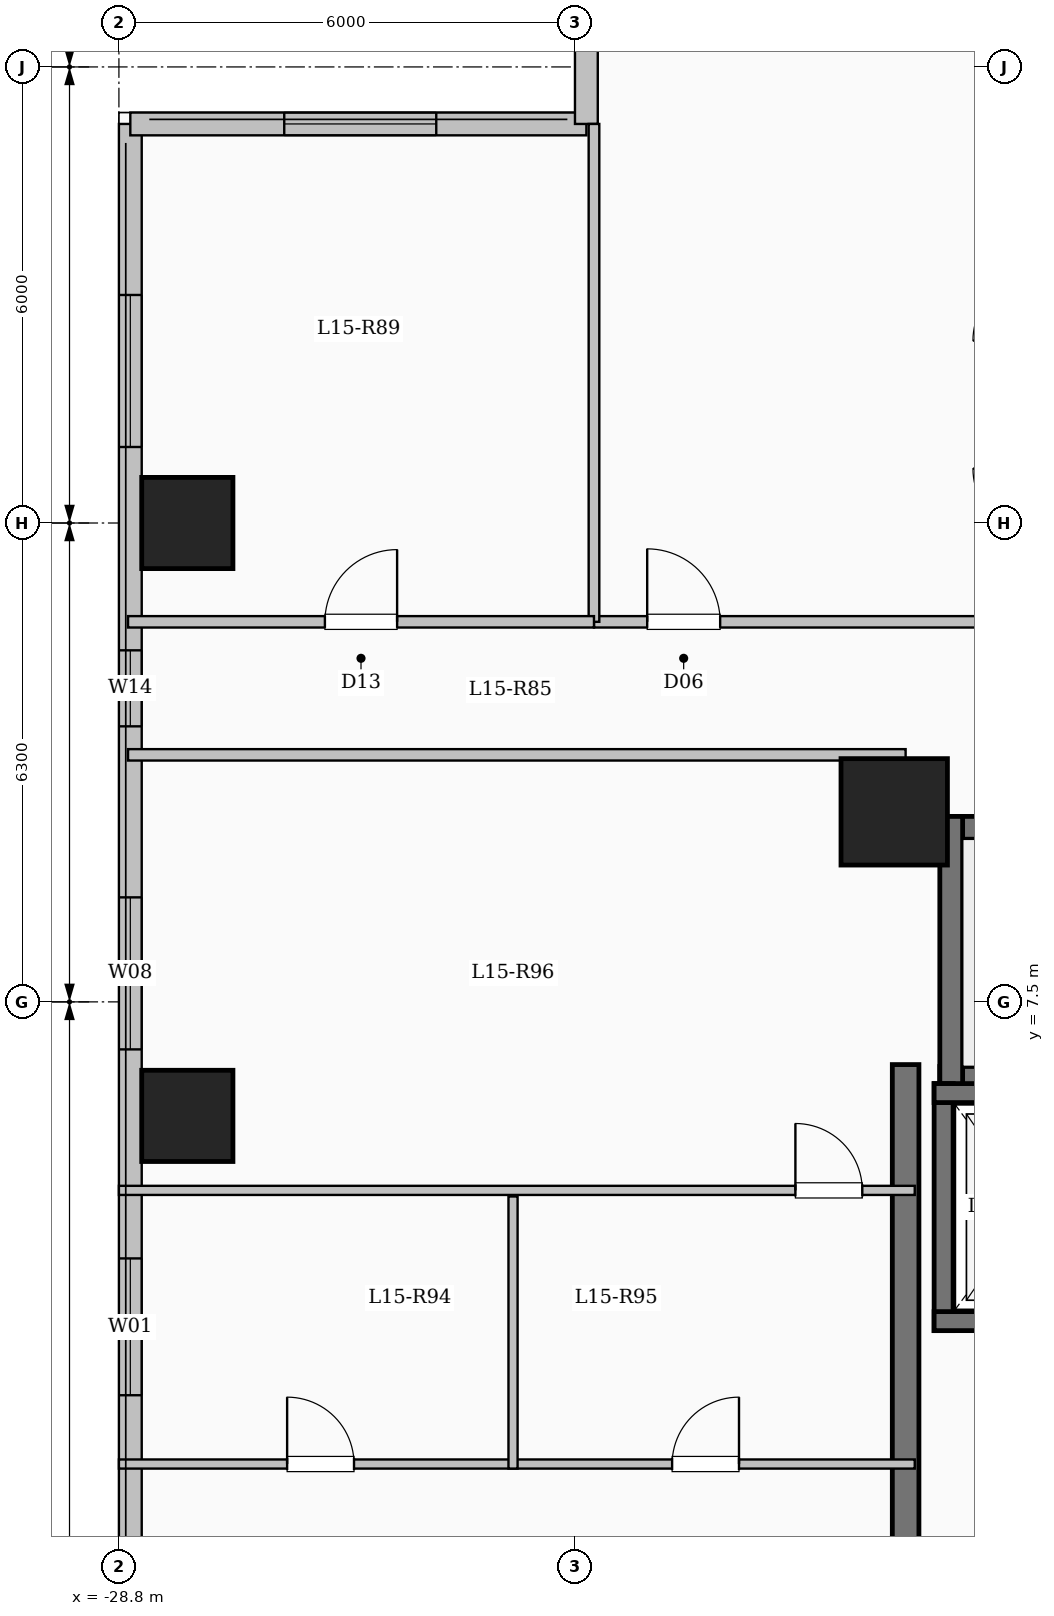
"""IFC4 building model, lengths in metres.
Left out: names, types, materials, properties, quantities, classifications, styles, units other than length and angle.
Written with IfcOpenShell. Run it as: python <this file> out.ifc"""

import sys

from ifc_helpers import new_model, si_unit, direction, frame, frame_2d, origin, origin_2d, place, context, subcontext, project, spatial, rectangle, extrude, element, fill, save


model = new_model("IFC4")
c1 = context("Model", 3, precision=1e-05, world=origin(), true_north=direction((0.0, 1.0)))
c2 = subcontext(c1, "Body", "Model", "MODEL_VIEW")
j1 = project(units=[si_unit("LENGTHUNIT", "METRE"), si_unit("PLANEANGLEUNIT", "RADIAN")], contexts=[c1])
p1 = place(None, origin())
s1 = spatial("IfcSite", under=j1, at=p1, CompositionType="ELEMENT")
p2 = place(p1, origin())
s2 = spatial("IfcBuilding", under=s1, at=p2, CompositionType="ELEMENT")
p3 = place(p2, frame((0.0, 0.0, 57.5)))
s3 = spatial("IfcBuildingStorey", under=s2, at=p3, CompositionType="ELEMENT", Elevation=57.5)
p4 = place(p3, frame((-18.6, 10.0, 0.0), z_axis=(0.0, 0.0, 1.0), x_axis=(1.0, 0.0, 0.0)))
e1 = element("IfcColumn", 1, at=p4, inside=s3, PredefinedType="COLUMN", context=c2, shape_type="SweptSolid", body=[
    extrude(rectangle(XDim=1.4, YDim=1.4, at=origin_2d()), origin(), (0.0, 0.0, 1.0), 3.35),
])
for number, where, z_axis, x_axis in (
    (2, (-27.9, 6.0, 0.0), (0.0, 0.0, 1.0), (1.0, 0.0, 0.0)),
    (3, (-27.9, 13.8, 0.0), (0.0, 0.0, 1.0), (1.0, 0.0, 0.0)),
):
    element("IfcColumn", number, at=place(p3, frame(where, z_axis=z_axis, x_axis=x_axis)), inside=s3, PredefinedType="COLUMN", context=c2, shape_type="SweptSolid", body=[
        extrude(rectangle(XDim=1.2, YDim=1.2, at=origin_2d()), origin(), (0.0, 0.0, 1.0), 3.35),
    ])
p5 = place(p3, frame((-28.65, -19.05, 0.0), z_axis=(0.0, 0.0, 1.0), x_axis=(0.0, 1.0, 0.0)))
e4 = element("IfcWall", 4, at=p5, inside=s3, PredefinedType="SOLIDWALL", context=c2, shape_type="SweptSolid", body=[
    extrude(rectangle(XDim=38.1, YDim=0.3, at=frame_2d((19.05, 0.0))), origin(), (0.0, 0.0, 1.0), 3.1),
])
p6 = place(p5, frame((3.15, 0.0, 0.9)))
e5 = element("IfcOpeningElement", 5, at=p6, cuts=e4, PredefinedType="OPENING", context=c2, shape_type="SweptSolid", body=[
    extrude(rectangle(XDim=2.4, YDim=1.8, at=frame_2d((1.2, 0.9))), frame((0.0, 0.16, 0.0), z_axis=(0.0, -1.0, 0.0), x_axis=(1.0, 0.0, 0.0)), (0.0, 0.0, 1.0), 0.32),
])
p7 = place(p5, frame((9.542, 0.0, 0.9)))
e6 = element("IfcOpeningElement", 6, at=p7, cuts=e4, PredefinedType="OPENING", context=c2, shape_type="SweptSolid", body=[
    extrude(rectangle(XDim=1.5, YDim=1.65, at=frame_2d((0.75, 0.825))), frame((0.0, 0.16, 0.0), z_axis=(0.0, -1.0, 0.0), x_axis=(1.0, 0.0, 0.0)), (0.0, 0.0, 1.0), 0.32),
])
p8 = place(p5, frame((14.95, 0.0, 0.9)))
e7 = element("IfcOpeningElement", 7, at=p8, cuts=e4, PredefinedType="OPENING", context=c2, shape_type="SweptSolid", body=[
    extrude(rectangle(XDim=2.4, YDim=1.8, at=frame_2d((1.2, 0.9))), frame((0.0, 0.16, 0.0), z_axis=(0.0, -1.0, 0.0), x_axis=(1.0, 0.0, 0.0)), (0.0, 0.0, 1.0), 0.32),
])
p9 = place(p5, frame((21.375, 0.0, 0.9)))
e8 = element("IfcOpeningElement", 8, at=p9, cuts=e4, PredefinedType="OPENING", context=c2, shape_type="SweptSolid", body=[
    extrude(rectangle(XDim=1.8, YDim=1.65, at=frame_2d((0.9, 0.825))), frame((0.0, 0.16, 0.0), z_axis=(0.0, -1.0, 0.0), x_axis=(1.0, 0.0, 0.0)), (0.0, 0.0, 1.0), 0.32),
])
p10 = place(p5, frame((25.925, 0.0, 0.9)))
e9 = element("IfcOpeningElement", 9, at=p10, cuts=e4, PredefinedType="OPENING", context=c2, shape_type="SweptSolid", body=[
    extrude(rectangle(XDim=2.0, YDim=1.7, at=frame_2d((1.0, 0.85))), frame((0.0, 0.16, 0.0), z_axis=(0.0, -1.0, 0.0), x_axis=(1.0, 0.0, 0.0)), (0.0, 0.0, 1.0), 0.32),
])
p11 = place(p5, frame((30.175, 0.0, 0.95)))
e10 = element("IfcOpeningElement", 10, at=p11, cuts=e4, PredefinedType="OPENING", context=c2, shape_type="SweptSolid", body=[
    extrude(rectangle(XDim=1.0, YDim=1.5, at=frame_2d((0.5, 0.75))), frame((0.0, 0.16, 0.0), z_axis=(0.0, -1.0, 0.0), x_axis=(1.0, 0.0, 0.0)), (0.0, 0.0, 1.0), 0.32),
])
p12 = place(p5, frame((33.85, 0.0, 0.9)))
e11 = element("IfcOpeningElement", 11, at=p12, cuts=e4, PredefinedType="OPENING", context=c2, shape_type="SweptSolid", body=[
    extrude(rectangle(XDim=2.0, YDim=1.7, at=frame_2d((1.0, 0.85))), frame((0.0, 0.16, 0.0), z_axis=(0.0, -1.0, 0.0), x_axis=(1.0, 0.0, 0.0)), (0.0, 0.0, 1.0), 0.32),
])
p13 = place(p3, frame((-28.65, 19.05, 0.0), z_axis=(0.0, 0.0, 1.0), x_axis=(1.0, 0.0, 0.0)))
e12 = element("IfcWall", 12, at=p13, inside=s3, PredefinedType="SOLIDWALL", context=c2, shape_type="SweptSolid", body=[
    extrude(rectangle(XDim=6.0, YDim=0.3, at=frame_2d((3.0, 0.0))), origin(), (0.0, 0.0, 1.0), 3.1),
])
p14 = place(p13, frame((2.025, 0.0, 0.9)))
e13 = element("IfcOpeningElement", 13, at=p14, cuts=e12, PredefinedType="OPENING", context=c2, shape_type="SweptSolid", body=[
    extrude(rectangle(XDim=2.0, YDim=1.7, at=frame_2d((1.0, 0.85))), frame((0.0, 0.16, 0.0), z_axis=(0.0, -1.0, 0.0), x_axis=(1.0, 0.0, 0.0)), (0.0, 0.0, 1.0), 0.32),
])
p15 = place(p3, frame((-22.65, 19.05, 0.0), z_axis=(0.0, 0.0, 1.0), x_axis=(0.0, 1.0, 0.0)))
e14 = element("IfcWall", 14, at=p15, inside=s3, PredefinedType="SOLIDWALL", context=c2, shape_type="SweptSolid", body=[
    extrude(rectangle(XDim=4.5, YDim=0.3, at=frame_2d((2.25, 0.0))), origin(), (0.0, 0.0, 1.0), 3.1),
])
p16 = place(p15, frame((1.032, 0.0, 0.9)))
e15 = element("IfcOpeningElement", 15, at=p16, cuts=e14, PredefinedType="OPENING", context=c2, shape_type="SweptSolid", body=[
    extrude(rectangle(XDim=2.4, YDim=1.8, at=frame_2d((1.2, 0.9))), frame((0.0, 0.16, 0.0), z_axis=(0.0, -1.0, 0.0), x_axis=(1.0, 0.0, 0.0)), (0.0, 0.0, 1.0), 0.32),
])
p17 = place(p3, frame((-18.0, 9.79, 0.0), z_axis=(0.0, 0.0, 1.0), x_axis=(1.0, 0.0, 0.0)))
e16 = element("IfcWall", 16, at=p17, inside=s3, PredefinedType="SHEAR", context=c2, shape_type="SweptSolid", body=[
    extrude(rectangle(XDim=8.0, YDim=0.3, at=frame_2d((4.0, 0.0))), origin(), (0.0, 0.0, 1.0), 3.35),
])
p18 = place(p3, frame((-18.0, 6.5, 0.0), z_axis=(0.0, 0.0, 1.0), x_axis=(1.0, 0.0, 0.0)))
e17 = element("IfcWall", 17, at=p18, inside=s3, PredefinedType="SHEAR", context=c2, shape_type="SweptSolid", body=[
    extrude(rectangle(XDim=8.0, YDim=0.3, at=frame_2d((4.0, 0.0))), origin(), (0.0, 0.0, 1.0), 3.35),
])
p19 = place(p18, frame((6.45, 0.0, 0.0)))
e18 = element("IfcOpeningElement", 18, at=p19, cuts=e17, PredefinedType="OPENING", context=c2, shape_type="SweptSolid", body=[
    extrude(rectangle(XDim=1.0, YDim=2.15, at=frame_2d((0.5, 1.075))), frame((0.0, 0.16, 0.0), z_axis=(0.0, -1.0, 0.0), x_axis=(1.0, 0.0, 0.0)), (0.0, 0.0, 1.0), 0.32),
])
p20 = place(p3, frame((-17.85, 6.35, 0.0), z_axis=(0.0, 0.0, 1.0), x_axis=(0.0, 1.0, 0.0)))
e19 = element("IfcWall", 19, at=p20, inside=s3, PredefinedType="SHEAR", context=c2, shape_type="SweptSolid", body=[
    extrude(rectangle(XDim=3.59, YDim=0.3, at=frame_2d((1.795, 0.0))), origin(), (0.0, 0.0, 1.0), 3.35),
])
p21 = place(p3, frame((-17.95, 3.175, 0.0), z_axis=(0.0, 0.0, 1.0), x_axis=(0.0, 1.0, 0.0)))
e20 = element("IfcWall", 20, at=p21, inside=s3, PredefinedType="SHEAR", context=c2, shape_type="SweptSolid", body=[
    extrude(rectangle(XDim=3.25, YDim=0.25, at=frame_2d((1.625, 0.0))), origin(), (0.0, 0.0, 1.0), 3.35),
])
for number, where, z_axis, x_axis in (
    (21, (-18.075, 3.3, 0.0), (0.0, 0.0, 1.0), (1.0, 0.0, 0.0)),
    (22, (-18.075, 6.3, 0.0), (0.0, 0.0, 1.0), (1.0, 0.0, 0.0)),
):
    element("IfcWall", number, at=place(p3, frame(where, z_axis=z_axis, x_axis=x_axis)), inside=s3, PredefinedType="SHEAR", context=c2, shape_type="SweptSolid", body=[
        extrude(rectangle(XDim=2.55, YDim=0.25, at=frame_2d((1.275, 0.0))), origin(), (0.0, 0.0, 1.0), 3.35),
    ])
p22 = place(p3, frame((-18.45, -7.375, 0.0), z_axis=(0.0, 0.0, 1.0), x_axis=(0.0, 1.0, 0.0)))
e23 = element("IfcWall", 23, at=p22, inside=s3, PredefinedType="SHEAR", context=c2, shape_type="SweptSolid", body=[
    extrude(rectangle(XDim=14.05, YDim=0.35, at=frame_2d((7.025, 0.0))), origin(), (0.0, 0.0, 1.0), 3.35),
])
p23 = place(p3, frame((-22.55, 12.5, 0.0), z_axis=(0.0, 0.0, 1.0), x_axis=(1.0, 0.0, 0.0)))
e24 = element("IfcWall", 24, at=p23, inside=s3, PredefinedType="PARTITIONING", context=c2, shape_type="SweptSolid", body=[
    extrude(rectangle(XDim=18.7, YDim=0.15, at=frame_2d((9.35, 0.0))), origin(), (0.0, 0.0, 1.0), 3.1),
])
p24 = place(p23, frame((0.7, 0.0, 0.0)))
e25 = element("IfcOpeningElement", 25, at=p24, cuts=e24, PredefinedType="OPENING", context=c2, shape_type="SweptSolid", body=[
    extrude(rectangle(XDim=0.96, YDim=2.15, at=frame_2d((0.48, 1.075))), frame((0.0, 0.085, 0.0), z_axis=(0.0, -1.0, 0.0), x_axis=(1.0, 0.0, 0.0)), (0.0, 0.0, 1.0), 0.17),
])
p25 = place(p23, frame((11.326, 0.0, 0.0)))
e26 = element("IfcOpeningElement", 26, at=p25, cuts=e24, PredefinedType="OPENING", context=c2, shape_type="SweptSolid", body=[
    extrude(rectangle(XDim=0.96, YDim=2.15, at=frame_2d((0.48, 1.075))), frame((0.0, 0.085, 0.0), z_axis=(0.0, -1.0, 0.0), x_axis=(1.0, 0.0, 0.0)), (0.0, 0.0, 1.0), 0.17),
])
p26 = place(p3, frame((-28.68, 10.75, 0.0), z_axis=(0.0, 0.0, 1.0), x_axis=(1.0, 0.0, 0.0)))
e27 = element("IfcWall", 27, at=p26, inside=s3, PredefinedType="PARTITIONING", context=c2, shape_type="SweptSolid", body=[
    extrude(rectangle(XDim=10.23, YDim=0.15, at=frame_2d((5.115, 0.0))), origin(), (0.0, 0.0, 1.0), 3.1),
])
p27 = place(p3, frame((-22.55, 12.5, 0.0), z_axis=(0.0, 0.0, 1.0), x_axis=(0.0, 1.0, 0.0)))
e28 = element("IfcWall", 28, at=p27, inside=s3, PredefinedType="PARTITIONING", context=c2, shape_type="SweptSolid", body=[
    extrude(rectangle(XDim=6.55, YDim=0.14, at=frame_2d((3.275, 0.0))), origin(), (0.0, 0.0, 1.0), 3.1),
])
p28 = place(p3, frame((-28.68, 12.5, 0.0), z_axis=(0.0, 0.0, 1.0), x_axis=(1.0, 0.0, 0.0)))
e29 = element("IfcWall", 29, at=p28, inside=s3, PredefinedType="PARTITIONING", context=c2, shape_type="SweptSolid", body=[
    extrude(rectangle(XDim=6.13, YDim=0.15, at=frame_2d((3.065, 0.0))), origin(), (0.0, 0.0, 1.0), 3.1),
])
p29 = place(p28, frame((2.59, 0.0, 0.0)))
e30 = element("IfcOpeningElement", 30, at=p29, cuts=e29, PredefinedType="OPENING", context=c2, shape_type="SweptSolid", body=[
    extrude(rectangle(XDim=0.95, YDim=2.15, at=frame_2d((0.475, 1.075))), frame((0.0, 0.085, 0.0), z_axis=(0.0, -1.0, 0.0), x_axis=(1.0, 0.0, 0.0)), (0.0, 0.0, 1.0), 0.17),
])
p30 = place(p3, frame((-28.8, 1.42, 0.0), z_axis=(0.0, 0.0, 1.0), x_axis=(1.0, 0.0, 0.0)))
e31 = element("IfcWall", 31, at=p30, inside=s3, PredefinedType="PARTITIONING", context=c2, shape_type="SweptSolid", body=[
    extrude(rectangle(XDim=10.47, YDim=0.12, at=frame_2d((5.235, 0.0))), origin(), (0.0, 0.0, 1.0), 3.1),
])
p31 = place(p30, frame((2.213, 0.0, 0.0)))
e32 = element("IfcOpeningElement", 32, at=p31, cuts=e31, PredefinedType="OPENING", context=c2, shape_type="SweptSolid", body=[
    extrude(rectangle(XDim=0.88, YDim=2.1, at=frame_2d((0.44, 1.05))), frame((0.0, 0.07, 0.0), z_axis=(0.0, -1.0, 0.0), x_axis=(1.0, 0.0, 0.0)), (0.0, 0.0, 1.0), 0.14),
])
p32 = place(p30, frame((7.278, 0.0, 0.0)))
e33 = element("IfcOpeningElement", 33, at=p32, cuts=e31, PredefinedType="OPENING", context=c2, shape_type="SweptSolid", body=[
    extrude(rectangle(XDim=0.88, YDim=2.1, at=frame_2d((0.44, 1.05))), frame((0.0, 0.07, 0.0), z_axis=(0.0, -1.0, 0.0), x_axis=(1.0, 0.0, 0.0)), (0.0, 0.0, 1.0), 0.14),
])
p33 = place(p3, frame((-28.8, 5.02, 0.0), z_axis=(0.0, 0.0, 1.0), x_axis=(1.0, 0.0, 0.0)))
e34 = element("IfcWall", 34, at=p33, inside=s3, PredefinedType="PARTITIONING", context=c2, shape_type="SweptSolid", body=[
    extrude(rectangle(XDim=10.47, YDim=0.12, at=frame_2d((5.235, 0.0))), origin(), (0.0, 0.0, 1.0), 3.1),
])
p34 = place(p33, frame((8.9, 0.0, 0.0)))
e35 = element("IfcOpeningElement", 35, at=p34, cuts=e34, PredefinedType="OPENING", context=c2, shape_type="SweptSolid", body=[
    extrude(rectangle(XDim=0.88, YDim=2.1, at=frame_2d((0.44, 1.05))), frame((0.0, 0.07, 0.0), z_axis=(0.0, -1.0, 0.0), x_axis=(1.0, 0.0, 0.0)), (0.0, 0.0, 1.0), 0.14),
])
p35 = place(p3, frame((-23.615, 1.36, 0.0), z_axis=(0.0, 0.0, 1.0), x_axis=(0.0, 1.0, 0.0)))
e36 = element("IfcWall", 36, at=p35, inside=s3, PredefinedType="PARTITIONING", context=c2, shape_type="SweptSolid", body=[
    extrude(rectangle(XDim=3.58, YDim=0.12, at=frame_2d((1.79, 0.0))), origin(), (0.0, 0.0, 1.0), 3.1),
])
p36 = place(p9, origin())
e37 = element("IfcWindow", 37, at=p36, inside=s3, PartitioningType="SINGLE_PANEL", PredefinedType="WINDOW", context=c2, shape_type="SweptSolid", body=[
    extrude(rectangle(XDim=1.8, YDim=1.65, at=frame_2d((0.9, 0.825))), frame((0.0, 0.03, 0.0), z_axis=(0.0, -1.0, 0.0), x_axis=(1.0, 0.0, 0.0)), (0.0, 0.0, 1.0), 0.06),
])
fill(e8, e37)
p37 = place(p10, origin())
e38 = element("IfcWindow", 38, at=p37, inside=s3, PartitioningType="SINGLE_PANEL", PredefinedType="WINDOW", context=c2, shape_type="SweptSolid", body=[
    extrude(rectangle(XDim=2.0, YDim=1.7, at=frame_2d((1.0, 0.85))), frame((0.0, 0.03, 0.0), z_axis=(0.0, -1.0, 0.0), x_axis=(1.0, 0.0, 0.0)), (0.0, 0.0, 1.0), 0.06),
])
fill(e9, e38)
p38 = place(p11, origin())
e39 = element("IfcWindow", 39, at=p38, inside=s3, PartitioningType="SINGLE_PANEL", PredefinedType="WINDOW", context=c2, shape_type="SweptSolid", body=[
    extrude(rectangle(XDim=1.0, YDim=1.5, at=frame_2d((0.5, 0.75))), frame((0.0, 0.03, 0.0), z_axis=(0.0, -1.0, 0.0), x_axis=(1.0, 0.0, 0.0)), (0.0, 0.0, 1.0), 0.06),
])
fill(e10, e39)
p39 = place(p12, origin())
e40 = element("IfcWindow", 40, at=p39, inside=s3, PartitioningType="SINGLE_PANEL", PredefinedType="WINDOW", context=c2, shape_type="SweptSolid", body=[
    extrude(rectangle(XDim=2.0, YDim=1.7, at=frame_2d((1.0, 0.85))), frame((0.0, 0.03, 0.0), z_axis=(0.0, -1.0, 0.0), x_axis=(1.0, 0.0, 0.0)), (0.0, 0.0, 1.0), 0.06),
])
fill(e11, e40)
p40 = place(p14, origin())
e41 = element("IfcWindow", 41, at=p40, inside=s3, PartitioningType="SINGLE_PANEL", PredefinedType="WINDOW", context=c2, shape_type="SweptSolid", body=[
    extrude(rectangle(XDim=2.0, YDim=1.7, at=frame_2d((1.0, 0.85))), frame((0.0, 0.03, 0.0), z_axis=(0.0, -1.0, 0.0), x_axis=(1.0, 0.0, 0.0)), (0.0, 0.0, 1.0), 0.06),
])
fill(e13, e41)
p41 = place(p24, origin())
e42 = element("IfcDoor", 42, at=p41, inside=s3, OperationType="SINGLE_SWING_LEFT", PredefinedType="DOOR", context=c2, shape_type="SweptSolid", body=[
    extrude(rectangle(XDim=0.96, YDim=2.15, at=frame_2d((0.48, 1.075))), frame((0.0, 0.025, 0.0), z_axis=(0.0, -1.0, 0.0), x_axis=(1.0, 0.0, 0.0)), (0.0, 0.0, 1.0), 0.05),
])
fill(e25, e42)
p42 = place(p29, origin())
e43 = element("IfcDoor", 43, at=p42, inside=s3, OperationType="SINGLE_SWING_RIGHT", PredefinedType="DOOR", context=c2, shape_type="SweptSolid", body=[
    extrude(rectangle(XDim=0.95, YDim=2.15, at=frame_2d((0.475, 1.075))), frame((0.0, 0.025, 0.0), z_axis=(0.0, -1.0, 0.0), x_axis=(1.0, 0.0, 0.0)), (0.0, 0.0, 1.0), 0.05),
])
fill(e30, e43)
p43 = place(p31, origin())
e44 = element("IfcDoor", 44, at=p43, inside=s3, OperationType="SINGLE_SWING_LEFT", PredefinedType="DOOR", context=c2, shape_type="SweptSolid", body=[
    extrude(rectangle(XDim=0.88, YDim=2.1, at=frame_2d((0.44, 1.05))), frame((0.0, 0.025, 0.0), z_axis=(0.0, -1.0, 0.0), x_axis=(1.0, 0.0, 0.0)), (0.0, 0.0, 1.0), 0.05),
])
fill(e32, e44)
p44 = place(p32, origin())
e45 = element("IfcDoor", 45, at=p44, inside=s3, OperationType="SINGLE_SWING_RIGHT", PredefinedType="DOOR", context=c2, shape_type="SweptSolid", body=[
    extrude(rectangle(XDim=0.88, YDim=2.1, at=frame_2d((0.44, 1.05))), frame((0.0, 0.025, 0.0), z_axis=(0.0, -1.0, 0.0), x_axis=(1.0, 0.0, 0.0)), (0.0, 0.0, 1.0), 0.05),
])
fill(e33, e45)
p45 = place(p34, origin())
e46 = element("IfcDoor", 46, at=p45, inside=s3, OperationType="SINGLE_SWING_LEFT", PredefinedType="DOOR", context=c2, shape_type="SweptSolid", body=[
    extrude(rectangle(XDim=0.88, YDim=2.1, at=frame_2d((0.44, 1.05))), frame((0.0, 0.025, 0.0), z_axis=(0.0, -1.0, 0.0), x_axis=(1.0, 0.0, 0.0)), (0.0, 0.0, 1.0), 0.05),
])
fill(e35, e46)
save(model, sys.argv[1])
